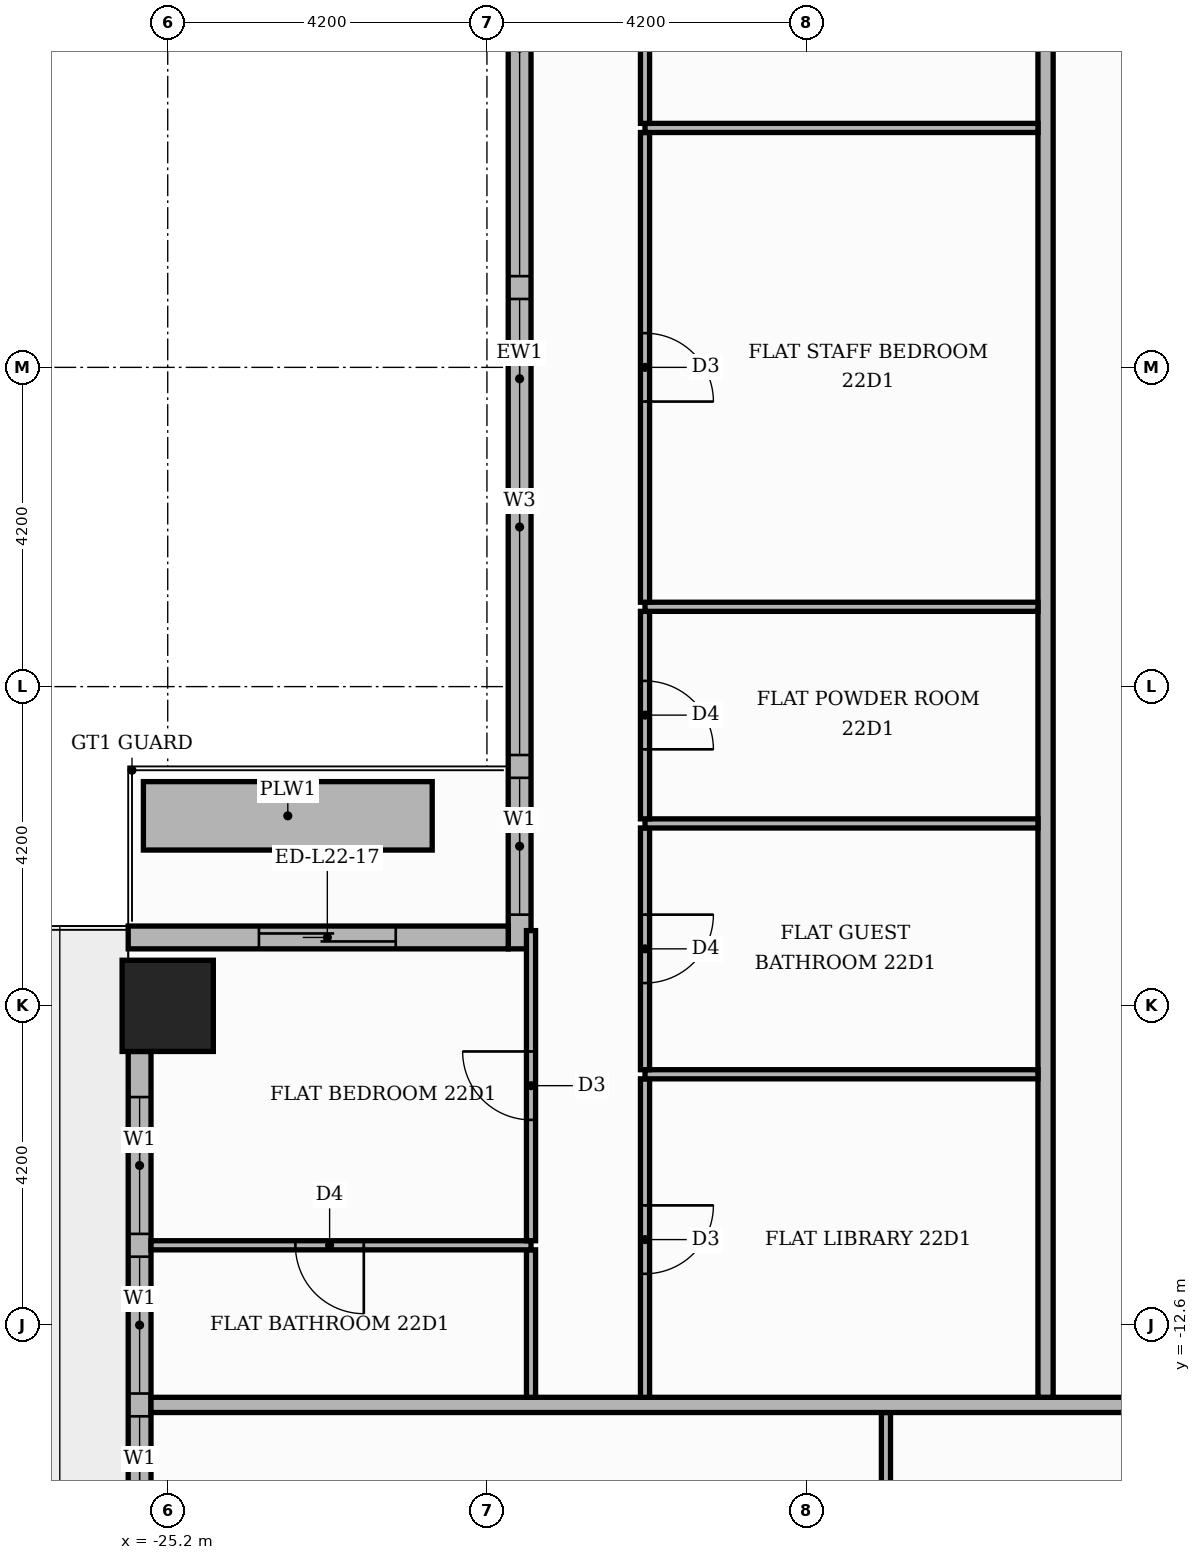
"""IFC4 building model, lengths in metres.
Left out: names, types, materials, properties, quantities, classifications, styles, units other than length and angle.
Written with IfcOpenShell. Run it as: python <this file> out.ifc"""

import sys

from ifc_helpers import new_model, si_unit, direction, frame, frame_2d, origin, origin_2d, place, context, subcontext, project, spatial, rectangle, extrude, element, fill, save


model = new_model("IFC4")
c1 = context("Model", 3, precision=1e-05, world=origin(), true_north=direction((0.0, 1.0)))
c2 = subcontext(c1, "Body", "Model", "MODEL_VIEW")
j1 = project(units=[si_unit("LENGTHUNIT", "METRE"), si_unit("PLANEANGLEUNIT", "RADIAN")], contexts=[c1])
p1 = place(None, origin())
s1 = spatial("IfcSite", under=j1, at=p1, CompositionType="ELEMENT")
p2 = place(p1, origin())
s2 = spatial("IfcBuilding", under=s1, at=p2, CompositionType="ELEMENT")
p3 = place(p2, frame((0.0, 0.0, 94.8)))
s3 = spatial("IfcBuildingStorey", under=s2, at=p3, CompositionType="ELEMENT", Elevation=94.8)
p4 = place(p3, frame((-25.2, -8.4, 0.0), z_axis=(0.0, 0.0, 1.0), x_axis=(1.0, 0.0, 0.0)))
e1 = element("IfcColumn", 1, at=p4, inside=s3, PredefinedType="COLUMN", context=c2, shape_type="SweptSolid", body=[
    extrude(rectangle(XDim=1.2, YDim=1.2, at=origin_2d()), origin(), (0.0, 0.0, 1.0), 3.9),
])
p5 = place(p3, frame((-20.57, 7.35, 0.0), z_axis=(0.0, 0.0, 1.0), x_axis=(0.0, -1.0, 0.0)))
e2 = element("IfcWall", 2, at=p5, inside=s3, PredefinedType="STANDARD", context=c2, shape_type="SweptSolid", body=[
    extrude(rectangle(XDim=15.0, YDim=0.3, at=frame_2d((7.5, 0.0))), origin(), (0.0, 0.0, 1.0), 3.48),
])
p6 = place(p5, frame((0.15, 0.0, 0.9)))
e3 = element("IfcOpeningElement", 3, at=p6, cuts=e2, PredefinedType="OPENING", context=c2, shape_type="SweptSolid", body=[
    extrude(rectangle(XDim=6.0, YDim=2.1, at=frame_2d((3.0, 1.05))), frame((0.0, 0.16, 0.0), z_axis=(0.0, -1.0, 0.0), x_axis=(1.0, 0.0, 0.0)), (0.0, 0.0, 1.0), 0.32),
])
p7 = place(p5, frame((6.45, 0.0, 0.9)))
e4 = element("IfcOpeningElement", 4, at=p7, cuts=e2, PredefinedType="OPENING", context=c2, shape_type="SweptSolid", body=[
    extrude(rectangle(XDim=6.0, YDim=2.1, at=frame_2d((3.0, 1.05))), frame((0.0, 0.16, 0.0), z_axis=(0.0, -1.0, 0.0), x_axis=(1.0, 0.0, 0.0)), (0.0, 0.0, 1.0), 0.32),
])
p8 = place(p5, frame((12.75, 0.0, 0.9)))
e5 = element("IfcOpeningElement", 5, at=p8, cuts=e2, PredefinedType="OPENING", context=c2, shape_type="SweptSolid", body=[
    extrude(rectangle(XDim=1.8, YDim=2.1, at=frame_2d((0.9, 1.05))), frame((0.0, 0.16, 0.0), z_axis=(0.0, -1.0, 0.0), x_axis=(1.0, 0.0, 0.0)), (0.0, 0.0, 1.0), 0.32),
])
p9 = place(p3, frame((-20.72, -7.5, 0.0), z_axis=(0.0, 0.0, 1.0), x_axis=(-1.0, 0.0, 0.0)))
e6 = element("IfcWall", 6, at=p9, inside=s3, PredefinedType="STANDARD", context=c2, shape_type="SweptSolid", body=[
    extrude(rectangle(XDim=5.0, YDim=0.3, at=frame_2d((2.5, 0.0))), origin(), (0.0, 0.0, 1.0), 3.48),
])
p10 = place(p9, frame((1.48, 0.0, 0.0)))
e7 = element("IfcOpeningElement", 7, at=p10, cuts=e6, PredefinedType="OPENING", context=c2, shape_type="SweptSolid", body=[
    extrude(rectangle(XDim=1.8, YDim=2.4, at=frame_2d((0.9, 1.2))), frame((0.0, 0.16, 0.0), z_axis=(0.0, -1.0, 0.0), x_axis=(1.0, 0.0, 0.0)), (0.0, 0.0, 1.0), 0.32),
])
p11 = place(p3, frame((-25.57, -9.0, 0.0), z_axis=(0.0, 0.0, 1.0), x_axis=(0.0, -1.0, 0.0)))
e8 = element("IfcWall", 8, at=p11, inside=s3, PredefinedType="STANDARD", context=c2, shape_type="SweptSolid", body=[
    extrude(rectangle(XDim=7.2, YDim=0.3, at=frame_2d((3.6, 0.0))), origin(), (0.0, 0.0, 1.0), 3.48),
])
p12 = place(p11, frame((0.6, 0.0, 0.9)))
e9 = element("IfcOpeningElement", 9, at=p12, cuts=e8, PredefinedType="OPENING", context=c2, shape_type="SweptSolid", body=[
    extrude(rectangle(XDim=1.8, YDim=2.1, at=frame_2d((0.9, 1.05))), frame((0.0, 0.16, 0.0), z_axis=(0.0, -1.0, 0.0), x_axis=(1.0, 0.0, 0.0)), (0.0, 0.0, 1.0), 0.32),
])
p13 = place(p11, frame((2.7, 0.0, 0.9)))
e10 = element("IfcOpeningElement", 10, at=p13, cuts=e8, PredefinedType="OPENING", context=c2, shape_type="SweptSolid", body=[
    extrude(rectangle(XDim=1.8, YDim=2.1, at=frame_2d((0.9, 1.05))), frame((0.0, 0.16, 0.0), z_axis=(0.0, -1.0, 0.0), x_axis=(1.0, 0.0, 0.0)), (0.0, 0.0, 1.0), 0.32),
])
p14 = place(p11, frame((4.8, 0.0, 0.9)))
e11 = element("IfcOpeningElement", 11, at=p14, cuts=e8, PredefinedType="OPENING", context=c2, shape_type="SweptSolid", body=[
    extrude(rectangle(XDim=1.8, YDim=2.1, at=frame_2d((0.9, 1.05))), frame((0.0, 0.16, 0.0), z_axis=(0.0, -1.0, 0.0), x_axis=(1.0, 0.0, 0.0)), (0.0, 0.0, 1.0), 0.32),
])
p15 = place(p3, frame((-25.52, -5.9, 0.0), z_axis=(0.0, 0.0, 1.0), x_axis=(1.0, 0.0, 0.0)))
e12 = element("IfcWall", 12, at=p15, inside=s3, PredefinedType="MOVABLE", context=c2, shape_type="SweptSolid", body=[
    extrude(rectangle(XDim=3.8, YDim=0.9, at=frame_2d((1.9, 0.0))), origin(), (0.0, 0.0, 1.0), 0.6),
])
p16 = place(p3, frame((-15.75, -20.06, 0.0), z_axis=(0.0, 0.0, 1.0), x_axis=(0.0, 1.0, 0.0)))
e13 = element("IfcWall", 13, at=p16, inside=s3, PredefinedType="PARTITIONING", context=c2, shape_type="SweptSolid", body=[
    extrude(rectangle(XDim=6.31, YDim=0.12, at=frame_2d((3.155, 0.0))), origin(), (0.0, 0.0, 1.0), 3.48),
])
p17 = place(p16, frame((2.675, 0.0, 0.0)))
e14 = element("IfcOpeningElement", 14, at=p17, cuts=e13, PredefinedType="OPENING", context=c2, shape_type="SweptSolid", body=[
    extrude(rectangle(XDim=1.0, YDim=2.1, at=frame_2d((0.5, 1.05))), frame((0.0, 0.07, 0.0), z_axis=(0.0, -1.0, 0.0), x_axis=(1.0, 0.0, 0.0)), (0.0, 0.0, 1.0), 0.14),
])
p18 = place(p3, frame((-25.42, -13.65, 0.0), z_axis=(0.0, 0.0, 1.0), x_axis=(1.0, 0.0, 0.0)))
e15 = element("IfcWall", 15, at=p18, inside=s3, PredefinedType="PARTITIONING", context=c2, shape_type="SweptSolid", body=[
    extrude(rectangle(XDim=39.07, YDim=0.2, at=frame_2d((19.535, 0.0))), origin(), (0.0, 0.0, 1.0), 3.48),
])
p19 = place(p18, frame((13.32, 0.0, 0.0)))
e16 = element("IfcOpeningElement", 16, at=p19, cuts=e15, PredefinedType="OPENING", context=c2, shape_type="SweptSolid", body=[
    extrude(rectangle(XDim=1.1, YDim=2.4, at=frame_2d((0.55, 1.2))), frame((0.0, 0.11, 0.0), z_axis=(0.0, -1.0, 0.0), x_axis=(1.0, 0.0, 0.0)), (0.0, 0.0, 1.0), 0.22),
])
p20 = place(p18, frame((23.82, 0.0, 0.0)))
e17 = element("IfcOpeningElement", 17, at=p20, cuts=e15, PredefinedType="OPENING", context=c2, shape_type="SweptSolid", body=[
    extrude(rectangle(XDim=1.1, YDim=2.4, at=frame_2d((0.55, 1.2))), frame((0.0, 0.11, 0.0), z_axis=(0.0, -1.0, 0.0), x_axis=(1.0, 0.0, 0.0)), (0.0, 0.0, 1.0), 0.22),
])
p21 = place(p3, frame((-20.42, -13.55, 0.0), z_axis=(0.0, 0.0, 1.0), x_axis=(0.0, 1.0, 0.0)))
e18 = element("IfcWall", 18, at=p21, inside=s3, PredefinedType="PARTITIONING", context=c2, shape_type="SweptSolid", body=[
    extrude(rectangle(XDim=1.94, YDim=0.12, at=frame_2d((0.97, 0.0))), origin(), (0.0, 0.0, 1.0), 3.48),
])
p22 = place(p3, frame((-18.92, -13.55, 0.0), z_axis=(0.0, 0.0, 1.0), x_axis=(0.0, 1.0, 0.0)))
e19 = element("IfcWall", 19, at=p22, inside=s3, PredefinedType="PARTITIONING", context=c2, shape_type="SweptSolid", body=[
    extrude(rectangle(XDim=4.19, YDim=0.12, at=frame_2d((2.095, 0.0))), origin(), (0.0, 0.0, 1.0), 3.48),
])
p23 = place(p22, frame((1.625, 0.0, 0.0)))
e20 = element("IfcOpeningElement", 20, at=p23, cuts=e19, PredefinedType="OPENING", context=c2, shape_type="SweptSolid", body=[
    extrude(rectangle(XDim=0.9, YDim=2.1, at=frame_2d((0.45, 1.05))), frame((0.0, 0.07, 0.0), z_axis=(0.0, -1.0, 0.0), x_axis=(1.0, 0.0, 0.0)), (0.0, 0.0, 1.0), 0.14),
])
p24 = place(p3, frame((-13.65, -13.55, 0.0), z_axis=(0.0, 0.0, 1.0), x_axis=(0.0, 1.0, 0.0)))
e21 = element("IfcWall", 21, at=p24, inside=s3, PredefinedType="PARTITIONING", context=c2, shape_type="SweptSolid", body=[
    extrude(rectangle(XDim=27.1, YDim=0.2, at=frame_2d((13.55, 0.0))), origin(), (0.0, 0.0, 1.0), 3.48),
])
p25 = place(p24, frame((24.55, 0.0, 0.0)))
e22 = element("IfcOpeningElement", 22, at=p25, cuts=e21, PredefinedType="OPENING", context=c2, shape_type="SweptSolid", body=[
    extrude(rectangle(XDim=1.1, YDim=2.4, at=frame_2d((0.55, 1.2))), frame((0.0, 0.11, 0.0), z_axis=(0.0, -1.0, 0.0), x_axis=(1.0, 0.0, 0.0)), (0.0, 0.0, 1.0), 0.22),
])
p26 = place(p3, frame((-25.42, -11.55, 0.0), z_axis=(0.0, 0.0, 1.0), x_axis=(1.0, 0.0, 0.0)))
e23 = element("IfcWall", 23, at=p26, inside=s3, PredefinedType="PARTITIONING", context=c2, shape_type="SweptSolid", body=[
    extrude(rectangle(XDim=5.0, YDim=0.12, at=frame_2d((2.5, 0.0))), origin(), (0.0, 0.0, 1.0), 3.48),
])
p27 = place(p26, frame((1.9, 0.0, 0.0)))
e24 = element("IfcOpeningElement", 24, at=p27, cuts=e23, PredefinedType="OPENING", context=c2, shape_type="SweptSolid", body=[
    extrude(rectangle(XDim=0.9, YDim=2.1, at=frame_2d((0.45, 1.05))), frame((0.0, 0.07, 0.0), z_axis=(0.0, -1.0, 0.0), x_axis=(1.0, 0.0, 0.0)), (0.0, 0.0, 1.0), 0.14),
])
p28 = place(p3, frame((-20.42, -11.49, 0.0), z_axis=(0.0, 0.0, 1.0), x_axis=(0.0, 1.0, 0.0)))
e25 = element("IfcWall", 25, at=p28, inside=s3, PredefinedType="PARTITIONING", context=c2, shape_type="SweptSolid", body=[
    extrude(rectangle(XDim=4.08, YDim=0.12, at=frame_2d((2.04, 0.0))), origin(), (0.0, 0.0, 1.0), 3.48),
])
p29 = place(p28, frame((1.59, 0.0, 0.0)))
e26 = element("IfcOpeningElement", 26, at=p29, cuts=e25, PredefinedType="OPENING", context=c2, shape_type="SweptSolid", body=[
    extrude(rectangle(XDim=0.9, YDim=2.1, at=frame_2d((0.45, 1.05))), frame((0.0, 0.07, 0.0), z_axis=(0.0, -1.0, 0.0), x_axis=(1.0, 0.0, 0.0)), (0.0, 0.0, 1.0), 0.14),
])
p30 = place(p3, frame((-18.92, -9.3, 0.0), z_axis=(0.0, 0.0, 1.0), x_axis=(1.0, 0.0, 0.0)))
e27 = element("IfcWall", 27, at=p30, inside=s3, PredefinedType="PARTITIONING", context=c2, shape_type="SweptSolid", body=[
    extrude(rectangle(XDim=5.17, YDim=0.12, at=frame_2d((2.585, 0.0))), origin(), (0.0, 0.0, 1.0), 3.48),
])
p31 = place(p3, frame((-18.92, -9.24, 0.0), z_axis=(0.0, 0.0, 1.0), x_axis=(0.0, 1.0, 0.0)))
e28 = element("IfcWall", 28, at=p31, inside=s3, PredefinedType="PARTITIONING", context=c2, shape_type="SweptSolid", body=[
    extrude(rectangle(XDim=3.18, YDim=0.12, at=frame_2d((1.59, 0.0))), origin(), (0.0, 0.0, 1.0), 3.48),
])
p32 = place(p31, frame((1.14, 0.0, 0.0)))
e29 = element("IfcOpeningElement", 29, at=p32, cuts=e28, PredefinedType="OPENING", context=c2, shape_type="SweptSolid", body=[
    extrude(rectangle(XDim=0.9, YDim=2.1, at=frame_2d((0.45, 1.05))), frame((0.0, 0.07, 0.0), z_axis=(0.0, -1.0, 0.0), x_axis=(1.0, 0.0, 0.0)), (0.0, 0.0, 1.0), 0.14),
])
p33 = place(p3, frame((-18.92, -6.0, 0.0), z_axis=(0.0, 0.0, 1.0), x_axis=(1.0, 0.0, 0.0)))
e30 = element("IfcWall", 30, at=p33, inside=s3, PredefinedType="PARTITIONING", context=c2, shape_type="SweptSolid", body=[
    extrude(rectangle(XDim=5.17, YDim=0.12, at=frame_2d((2.585, 0.0))), origin(), (0.0, 0.0, 1.0), 3.48),
])
p34 = place(p3, frame((-18.92, -5.94, 0.0), z_axis=(0.0, 0.0, 1.0), x_axis=(0.0, 1.0, 0.0)))
e31 = element("IfcWall", 31, at=p34, inside=s3, PredefinedType="PARTITIONING", context=c2, shape_type="SweptSolid", body=[
    extrude(rectangle(XDim=2.73, YDim=0.12, at=frame_2d((1.365, 0.0))), origin(), (0.0, 0.0, 1.0), 3.48),
])
p35 = place(p34, frame((0.915, 0.0, 0.0)))
e32 = element("IfcOpeningElement", 32, at=p35, cuts=e31, PredefinedType="OPENING", context=c2, shape_type="SweptSolid", body=[
    extrude(rectangle(XDim=0.9, YDim=2.1, at=frame_2d((0.45, 1.05))), frame((0.0, 0.07, 0.0), z_axis=(0.0, -1.0, 0.0), x_axis=(1.0, 0.0, 0.0)), (0.0, 0.0, 1.0), 0.14),
])
p36 = place(p3, frame((-18.92, -3.15, 0.0), z_axis=(0.0, 0.0, 1.0), x_axis=(1.0, 0.0, 0.0)))
e33 = element("IfcWall", 33, at=p36, inside=s3, PredefinedType="PARTITIONING", context=c2, shape_type="SweptSolid", body=[
    extrude(rectangle(XDim=5.17, YDim=0.12, at=frame_2d((2.585, 0.0))), origin(), (0.0, 0.0, 1.0), 3.48),
])
p37 = place(p3, frame((-18.92, -3.09, 0.0), z_axis=(0.0, 0.0, 1.0), x_axis=(0.0, 1.0, 0.0)))
e34 = element("IfcWall", 34, at=p37, inside=s3, PredefinedType="PARTITIONING", context=c2, shape_type="SweptSolid", body=[
    extrude(rectangle(XDim=6.18, YDim=0.12, at=frame_2d((3.09, 0.0))), origin(), (0.0, 0.0, 1.0), 3.48),
])
p38 = place(p37, frame((2.64, 0.0, 0.0)))
e35 = element("IfcOpeningElement", 35, at=p38, cuts=e34, PredefinedType="OPENING", context=c2, shape_type="SweptSolid", body=[
    extrude(rectangle(XDim=0.9, YDim=2.1, at=frame_2d((0.45, 1.05))), frame((0.0, 0.07, 0.0), z_axis=(0.0, -1.0, 0.0), x_axis=(1.0, 0.0, 0.0)), (0.0, 0.0, 1.0), 0.14),
])
p39 = place(p3, frame((-18.92, 3.15, 0.0), z_axis=(0.0, 0.0, 1.0), x_axis=(1.0, 0.0, 0.0)))
e36 = element("IfcWall", 36, at=p39, inside=s3, PredefinedType="PARTITIONING", context=c2, shape_type="SweptSolid", body=[
    extrude(rectangle(XDim=5.17, YDim=0.12, at=frame_2d((2.585, 0.0))), origin(), (0.0, 0.0, 1.0), 3.48),
])
p40 = place(p3, frame((-18.92, 3.21, 0.0), z_axis=(0.0, 0.0, 1.0), x_axis=(0.0, 1.0, 0.0)))
e37 = element("IfcWall", 37, at=p40, inside=s3, PredefinedType="PARTITIONING", context=c2, shape_type="SweptSolid", body=[
    extrude(rectangle(XDim=6.18, YDim=0.12, at=frame_2d((3.09, 0.0))), origin(), (0.0, 0.0, 1.0), 3.48),
])
p41 = place(p40, frame((2.64, 0.0, 0.0)))
e38 = element("IfcOpeningElement", 38, at=p41, cuts=e37, PredefinedType="OPENING", context=c2, shape_type="SweptSolid", body=[
    extrude(rectangle(XDim=0.9, YDim=2.1, at=frame_2d((0.45, 1.05))), frame((0.0, 0.07, 0.0), z_axis=(0.0, -1.0, 0.0), x_axis=(1.0, 0.0, 0.0)), (0.0, 0.0, 1.0), 0.14),
])
p42 = place(p6, origin())
e39 = element("IfcWindow", 39, at=p42, inside=s3, PartitioningType="SINGLE_PANEL", PredefinedType="WINDOW", context=c2, shape_type="SweptSolid", body=[
    extrude(rectangle(XDim=6.0, YDim=2.1, at=frame_2d((3.0, 1.05))), frame((0.0, 0.03, 0.0), z_axis=(0.0, -1.0, 0.0), x_axis=(1.0, 0.0, 0.0)), (0.0, 0.0, 1.0), 0.06),
])
fill(e3, e39)
p43 = place(p7, origin())
e40 = element("IfcWindow", 40, at=p43, inside=s3, PartitioningType="SINGLE_PANEL", PredefinedType="WINDOW", context=c2, shape_type="SweptSolid", body=[
    extrude(rectangle(XDim=6.0, YDim=2.1, at=frame_2d((3.0, 1.05))), frame((0.0, 0.03, 0.0), z_axis=(0.0, -1.0, 0.0), x_axis=(1.0, 0.0, 0.0)), (0.0, 0.0, 1.0), 0.06),
])
fill(e4, e40)
p44 = place(p8, origin())
e41 = element("IfcWindow", 41, at=p44, inside=s3, PartitioningType="SINGLE_PANEL", PredefinedType="WINDOW", context=c2, shape_type="SweptSolid", body=[
    extrude(rectangle(XDim=1.8, YDim=2.1, at=frame_2d((0.9, 1.05))), frame((0.0, 0.03, 0.0), z_axis=(0.0, -1.0, 0.0), x_axis=(1.0, 0.0, 0.0)), (0.0, 0.0, 1.0), 0.06),
])
fill(e5, e41)
p45 = place(p10, origin())
e42 = element("IfcDoor", 42, at=p45, inside=s3, OperationType="SLIDING_TO_RIGHT", PredefinedType="DOOR", context=c2, shape_type="SweptSolid", body=[
    extrude(rectangle(XDim=1.8, YDim=2.4, at=frame_2d((0.9, 1.2))), frame((0.0, 0.025, 0.0), z_axis=(0.0, -1.0, 0.0), x_axis=(1.0, 0.0, 0.0)), (0.0, 0.0, 1.0), 0.05),
])
fill(e7, e42)
p46 = place(p12, origin())
e43 = element("IfcWindow", 43, at=p46, inside=s3, PartitioningType="SINGLE_PANEL", PredefinedType="WINDOW", context=c2, shape_type="SweptSolid", body=[
    extrude(rectangle(XDim=1.8, YDim=2.1, at=frame_2d((0.9, 1.05))), frame((0.0, 0.03, 0.0), z_axis=(0.0, -1.0, 0.0), x_axis=(1.0, 0.0, 0.0)), (0.0, 0.0, 1.0), 0.06),
])
fill(e9, e43)
p47 = place(p13, origin())
e44 = element("IfcWindow", 44, at=p47, inside=s3, PartitioningType="SINGLE_PANEL", PredefinedType="WINDOW", context=c2, shape_type="SweptSolid", body=[
    extrude(rectangle(XDim=1.8, YDim=2.1, at=frame_2d((0.9, 1.05))), frame((0.0, 0.03, 0.0), z_axis=(0.0, -1.0, 0.0), x_axis=(1.0, 0.0, 0.0)), (0.0, 0.0, 1.0), 0.06),
])
fill(e10, e44)
p48 = place(p14, origin())
e45 = element("IfcWindow", 45, at=p48, inside=s3, PartitioningType="SINGLE_PANEL", PredefinedType="WINDOW", context=c2, shape_type="SweptSolid", body=[
    extrude(rectangle(XDim=1.8, YDim=2.1, at=frame_2d((0.9, 1.05))), frame((0.0, 0.03, 0.0), z_axis=(0.0, -1.0, 0.0), x_axis=(1.0, 0.0, 0.0)), (0.0, 0.0, 1.0), 0.06),
])
fill(e11, e45)
p49 = place(p38, frame((0.9, 0.0, 0.0), z_axis=(0.0, 0.0, 1.0), x_axis=(-1.0, 0.0, 0.0)))
e46 = element("IfcDoor", 46, at=p49, inside=s3, OperationType="SINGLE_SWING_LEFT", PredefinedType="DOOR", context=c2, shape_type="SweptSolid", body=[
    extrude(rectangle(XDim=0.9, YDim=2.1, at=frame_2d((0.45, 1.05))), frame((0.0, 0.025, 0.0), z_axis=(0.0, -1.0, 0.0), x_axis=(1.0, 0.0, 0.0)), (0.0, 0.0, 1.0), 0.05),
])
fill(e35, e46)
p50 = place(p35, frame((0.9, 0.0, 0.0), z_axis=(0.0, 0.0, 1.0), x_axis=(-1.0, 0.0, 0.0)))
e47 = element("IfcDoor", 47, at=p50, inside=s3, OperationType="SINGLE_SWING_LEFT", PredefinedType="DOOR", context=c2, shape_type="SweptSolid", body=[
    extrude(rectangle(XDim=0.9, YDim=2.1, at=frame_2d((0.45, 1.05))), frame((0.0, 0.025, 0.0), z_axis=(0.0, -1.0, 0.0), x_axis=(1.0, 0.0, 0.0)), (0.0, 0.0, 1.0), 0.05),
])
fill(e32, e47)
p51 = place(p32, frame((0.9, 0.0, 0.0), z_axis=(0.0, 0.0, 1.0), x_axis=(-1.0, 0.0, 0.0)))
e48 = element("IfcDoor", 48, at=p51, inside=s3, OperationType="SINGLE_SWING_RIGHT", PredefinedType="DOOR", context=c2, shape_type="SweptSolid", body=[
    extrude(rectangle(XDim=0.9, YDim=2.1, at=frame_2d((0.45, 1.05))), frame((0.0, 0.025, 0.0), z_axis=(0.0, -1.0, 0.0), x_axis=(1.0, 0.0, 0.0)), (0.0, 0.0, 1.0), 0.05),
])
fill(e29, e48)
p52 = place(p23, frame((0.9, 0.0, 0.0), z_axis=(0.0, 0.0, 1.0), x_axis=(-1.0, 0.0, 0.0)))
e49 = element("IfcDoor", 49, at=p52, inside=s3, OperationType="SINGLE_SWING_RIGHT", PredefinedType="DOOR", context=c2, shape_type="SweptSolid", body=[
    extrude(rectangle(XDim=0.9, YDim=2.1, at=frame_2d((0.45, 1.05))), frame((0.0, 0.025, 0.0), z_axis=(0.0, -1.0, 0.0), x_axis=(1.0, 0.0, 0.0)), (0.0, 0.0, 1.0), 0.05),
])
fill(e20, e49)
p53 = place(p29, origin())
e50 = element("IfcDoor", 50, at=p53, inside=s3, OperationType="SINGLE_SWING_RIGHT", PredefinedType="DOOR", context=c2, shape_type="SweptSolid", body=[
    extrude(rectangle(XDim=0.9, YDim=2.1, at=frame_2d((0.45, 1.05))), frame((0.0, 0.025, 0.0), z_axis=(0.0, -1.0, 0.0), x_axis=(1.0, 0.0, 0.0)), (0.0, 0.0, 1.0), 0.05),
])
fill(e26, e50)
p54 = place(p27, frame((0.9, 0.0, 0.0), z_axis=(0.0, 0.0, 1.0), x_axis=(-1.0, 0.0, 0.0)))
e51 = element("IfcDoor", 51, at=p54, inside=s3, OperationType="SINGLE_SWING_RIGHT", PredefinedType="DOOR", context=c2, shape_type="SweptSolid", body=[
    extrude(rectangle(XDim=0.9, YDim=2.1, at=frame_2d((0.45, 1.05))), frame((0.0, 0.025, 0.0), z_axis=(0.0, -1.0, 0.0), x_axis=(1.0, 0.0, 0.0)), (0.0, 0.0, 1.0), 0.05),
])
fill(e24, e51)
save(model, sys.argv[1])
